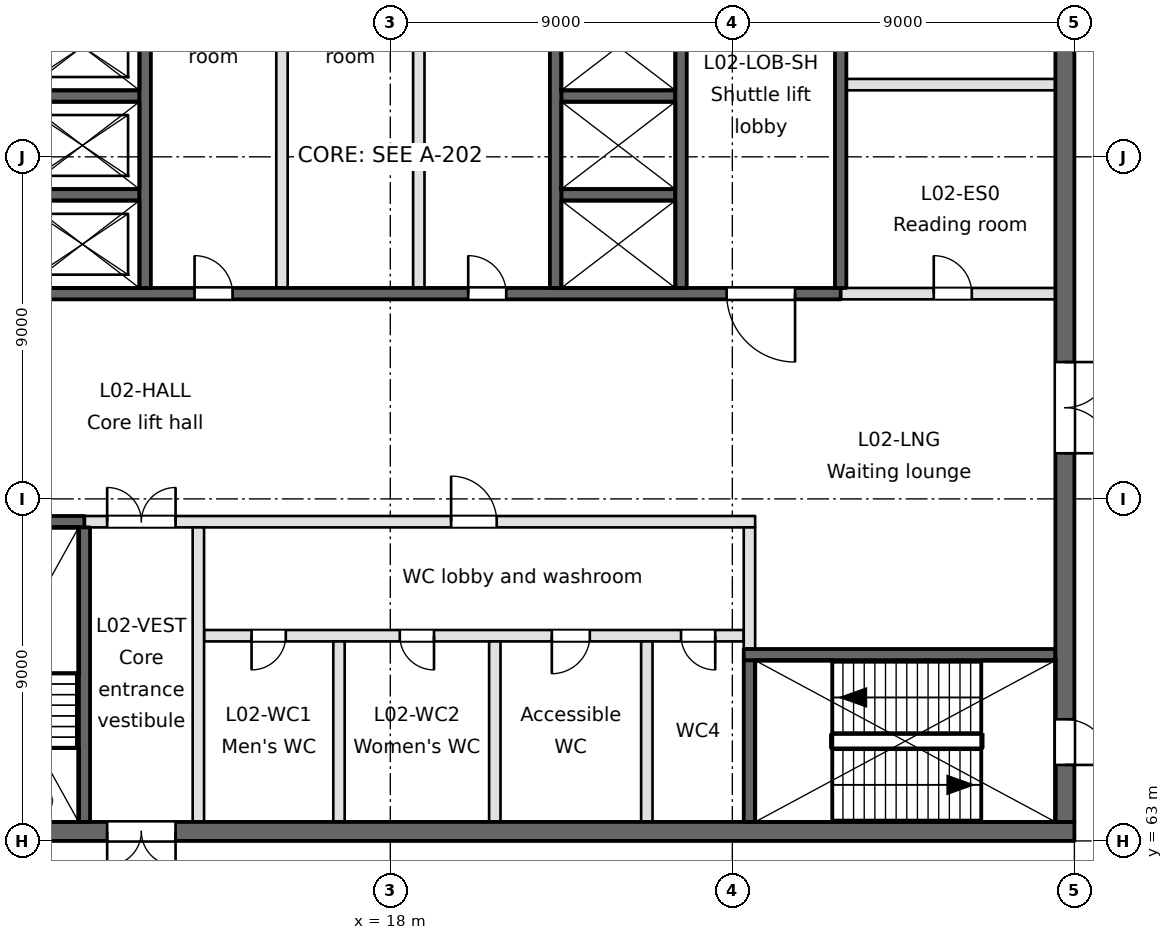
"""IFC4 building model, lengths in metres.
Left out: names, types, materials, properties, quantities, classifications, styles, units other than length and angle.
Written with IfcOpenShell. Run it as: python <this file> out.ifc"""

import sys

from ifc_helpers import new_model, si_unit, direction, frame, frame_2d, origin, place, context, subcontext, project, spatial, rectangle, extrude, element, fill, save


model = new_model("IFC4")
c1 = context("Model", 3, precision=1e-05, world=origin(), true_north=direction((0.0, 1.0)))
c2 = subcontext(c1, "Body", "Model", "MODEL_VIEW")
j1 = project(units=[si_unit("LENGTHUNIT", "METRE"), si_unit("PLANEANGLEUNIT", "RADIAN")], contexts=[c1])
p1 = place(None, origin())
s1 = spatial("IfcSite", under=j1, at=p1, CompositionType="ELEMENT")
p2 = place(p1, origin())
s2 = spatial("IfcBuilding", under=s1, at=p2, CompositionType="ELEMENT")
p3 = place(p2, frame((0.0, 0.0, 11.4)))
s3 = spatial("IfcBuildingStorey", under=s2, at=p3, CompositionType="ELEMENT", Elevation=11.4)
p4 = place(p3, frame((0.9, 63.25, -0.35), z_axis=(0.0, 0.0, 1.0), x_axis=(1.0, 0.0, 0.0)))
e1 = element("IfcWall", 1, at=p4, inside=s3, PredefinedType="SOLIDWALL", context=c2, shape_type="SweptSolid", body=[
    extrude(rectangle(XDim=35.1, YDim=0.5, at=frame_2d((17.55, 0.0))), origin(), (0.0, 0.0, 1.0), 5.4),
])
p5 = place(p4, frame((9.65, 0.0, 0.35)))
e2 = element("IfcOpeningElement", 2, at=p5, cuts=e1, PredefinedType="OPENING", context=c2, shape_type="SweptSolid", body=[
    extrude(rectangle(XDim=1.8, YDim=2.1, at=frame_2d((0.9, 1.05))), frame((0.0, 0.25, 0.0), z_axis=(0.0, -1.0, 0.0), x_axis=(1.0, 0.0, 0.0)), (0.0, 0.0, 1.0), 0.5),
])
p6 = place(p4, frame((1.55, 0.0, 0.35)))
e3 = element("IfcOpeningElement", 3, at=p6, cuts=e1, PredefinedType="OPENING", context=c2, shape_type="SweptSolid", body=[
    extrude(rectangle(XDim=1.2, YDim=2.1, at=frame_2d((0.6, 1.05))), frame((0.0, 0.25, 0.0), z_axis=(0.0, -1.0, 0.0), x_axis=(1.0, 0.0, 0.0)), (0.0, 0.0, 1.0), 0.5),
])
p7 = place(p4, frame((6.15, 0.0, 0.35)))
e4 = element("IfcOpeningElement", 4, at=p7, cuts=e1, PredefinedType="OPENING", context=c2, shape_type="SweptSolid", body=[
    extrude(rectangle(XDim=1.2, YDim=2.1, at=frame_2d((0.6, 1.05))), frame((0.0, 0.25, 0.0), z_axis=(0.0, -1.0, 0.0), x_axis=(1.0, 0.0, 0.0)), (0.0, 0.0, 1.0), 0.5),
])
p8 = place(p3, frame((27.3, 67.9, -0.35), z_axis=(0.0, 0.0, 1.0), x_axis=(1.0, 0.0, 0.0)))
e5 = element("IfcWall", 5, at=p8, inside=s3, PredefinedType="SOLIDWALL", context=c2, shape_type="SweptSolid", body=[
    extrude(rectangle(XDim=8.2, YDim=0.3, at=frame_2d((4.1, 0.0))), origin(), (0.0, 0.0, 1.0), 5.4),
])
p9 = place(p3, frame((13.1, 68.4, 0.0), z_axis=(0.0, 0.0, 1.0), x_axis=(1.0, 0.0, 0.0)))
e6 = element("IfcWall", 6, at=p9, inside=s3, PredefinedType="PARTITIONING", context=c2, shape_type="SweptSolid", body=[
    extrude(rectangle(XDim=14.2, YDim=0.3, at=frame_2d((7.1, 0.0))), origin(), (0.0, 0.0, 1.0), 5.05),
])
p10 = place(p9, frame((1.25, 0.0, 0.0)))
e7 = element("IfcOpeningElement", 7, at=p10, cuts=e6, PredefinedType="OPENING", context=c2, shape_type="SweptSolid", body=[
    extrude(rectangle(XDim=0.9, YDim=2.1, at=frame_2d((0.45, 1.05))), frame((0.0, 0.15, 0.0), z_axis=(0.0, -1.0, 0.0), x_axis=(1.0, 0.0, 0.0)), (0.0, 0.0, 1.0), 0.3),
])
p11 = place(p9, frame((5.15, 0.0, 0.0)))
e8 = element("IfcOpeningElement", 8, at=p11, cuts=e6, PredefinedType="OPENING", context=c2, shape_type="SweptSolid", body=[
    extrude(rectangle(XDim=0.9, YDim=2.1, at=frame_2d((0.45, 1.05))), frame((0.0, 0.15, 0.0), z_axis=(0.0, -1.0, 0.0), x_axis=(1.0, 0.0, 0.0)), (0.0, 0.0, 1.0), 0.3),
])
p12 = place(p9, frame((9.15, 0.0, 0.0)))
e9 = element("IfcOpeningElement", 9, at=p12, cuts=e6, PredefinedType="OPENING", context=c2, shape_type="SweptSolid", body=[
    extrude(rectangle(XDim=1.0, YDim=2.1, at=frame_2d((0.5, 1.05))), frame((0.0, 0.15, 0.0), z_axis=(0.0, -1.0, 0.0), x_axis=(1.0, 0.0, 0.0)), (0.0, 0.0, 1.0), 0.3),
])
p13 = place(p9, frame((12.55, 0.0, 0.0)))
e10 = element("IfcOpeningElement", 10, at=p13, cuts=e6, PredefinedType="OPENING", context=c2, shape_type="SweptSolid", body=[
    extrude(rectangle(XDim=0.9, YDim=2.1, at=frame_2d((0.45, 1.05))), frame((0.0, 0.15, 0.0), z_axis=(0.0, -1.0, 0.0), x_axis=(1.0, 0.0, 0.0)), (0.0, 0.0, 1.0), 0.3),
])
p14 = place(p3, frame((0.9, 71.4, -0.35), z_axis=(0.0, 0.0, 1.0), x_axis=(1.0, 0.0, 0.0)))
e11 = element("IfcWall", 11, at=p14, inside=s3, PredefinedType="SOLIDWALL", context=c2, shape_type="SweptSolid", body=[
    extrude(rectangle(XDim=9.05, YDim=0.3, at=frame_2d((4.525, 0.0))), origin(), (0.0, 0.0, 1.0), 5.4),
])
p15 = place(p3, frame((9.95, 71.4, 0.0), z_axis=(0.0, 0.0, 1.0), x_axis=(1.0, 0.0, 0.0)))
e12 = element("IfcWall", 12, at=p15, inside=s3, PredefinedType="PARTITIONING", context=c2, shape_type="SweptSolid", body=[
    extrude(rectangle(XDim=17.65, YDim=0.3, at=frame_2d((8.825, 0.0))), origin(), (0.0, 0.0, 1.0), 5.05),
])
p16 = place(p15, frame((0.6, 0.0, 0.0)))
e13 = element("IfcOpeningElement", 13, at=p16, cuts=e12, PredefinedType="OPENING", context=c2, shape_type="SweptSolid", body=[
    extrude(rectangle(XDim=1.8, YDim=2.1, at=frame_2d((0.9, 1.05))), frame((0.0, 0.15, 0.0), z_axis=(0.0, -1.0, 0.0), x_axis=(1.0, 0.0, 0.0)), (0.0, 0.0, 1.0), 0.3),
])
p17 = place(p15, frame((9.65, 0.0, 0.0)))
e14 = element("IfcOpeningElement", 14, at=p17, cuts=e12, PredefinedType="OPENING", context=c2, shape_type="SweptSolid", body=[
    extrude(rectangle(XDim=1.2, YDim=2.1, at=frame_2d((0.6, 1.05))), frame((0.0, 0.15, 0.0), z_axis=(0.0, -1.0, 0.0), x_axis=(1.0, 0.0, 0.0)), (0.0, 0.0, 1.0), 0.3),
])
p18 = place(p3, frame((0.9, 77.4, -0.35), z_axis=(0.0, 0.0, 1.0), x_axis=(1.0, 0.0, 0.0)))
e15 = element("IfcWall", 15, at=p18, inside=s3, PredefinedType="SOLIDWALL", context=c2, shape_type="SweptSolid", body=[
    extrude(rectangle(XDim=28.95, YDim=0.3, at=frame_2d((14.475, 0.0))), origin(), (0.0, 0.0, 1.0), 5.4),
])
p19 = place(p18, frame((4.35, 0.0, 0.35)))
e16 = element("IfcOpeningElement", 16, at=p19, cuts=e15, PredefinedType="OPENING", context=c2, shape_type="SweptSolid", body=[
    extrude(rectangle(XDim=1.8, YDim=2.1, at=frame_2d((0.9, 1.05))), frame((0.0, 0.15, 0.0), z_axis=(0.0, -1.0, 0.0), x_axis=(1.0, 0.0, 0.0)), (0.0, 0.0, 1.0), 0.3),
])
p20 = place(p18, frame((25.95, 0.0, 0.35)))
e17 = element("IfcOpeningElement", 17, at=p20, cuts=e15, PredefinedType="OPENING", context=c2, shape_type="SweptSolid", body=[
    extrude(rectangle(XDim=1.8, YDim=2.1, at=frame_2d((0.9, 1.05))), frame((0.0, 0.15, 0.0), z_axis=(0.0, -1.0, 0.0), x_axis=(1.0, 0.0, 0.0)), (0.0, 0.0, 1.0), 0.3),
])
p21 = place(p18, frame((11.95, 0.0, 0.35)))
e18 = element("IfcOpeningElement", 18, at=p21, cuts=e15, PredefinedType="OPENING", context=c2, shape_type="SweptSolid", body=[
    extrude(rectangle(XDim=1.0, YDim=2.1, at=frame_2d((0.5, 1.05))), frame((0.0, 0.15, 0.0), z_axis=(0.0, -1.0, 0.0), x_axis=(1.0, 0.0, 0.0)), (0.0, 0.0, 1.0), 0.3),
])
p22 = place(p18, frame((19.15, 0.0, 0.35)))
e19 = element("IfcOpeningElement", 19, at=p22, cuts=e15, PredefinedType="OPENING", context=c2, shape_type="SweptSolid", body=[
    extrude(rectangle(XDim=1.0, YDim=2.1, at=frame_2d((0.5, 1.05))), frame((0.0, 0.15, 0.0), z_axis=(0.0, -1.0, 0.0), x_axis=(1.0, 0.0, 0.0)), (0.0, 0.0, 1.0), 0.3),
])
p23 = place(p3, frame((29.85, 77.4, 0.0), z_axis=(0.0, 0.0, 1.0), x_axis=(1.0, 0.0, 0.0)))
e20 = element("IfcWall", 20, at=p23, inside=s3, PredefinedType="PARTITIONING", context=c2, shape_type="SweptSolid", body=[
    extrude(rectangle(XDim=5.65, YDim=0.3, at=frame_2d((2.825, 0.0))), origin(), (0.0, 0.0, 1.0), 5.05),
])
p24 = place(p23, frame((2.45, 0.0, 0.0)))
e21 = element("IfcOpeningElement", 21, at=p24, cuts=e20, PredefinedType="OPENING", context=c2, shape_type="SweptSolid", body=[
    extrude(rectangle(XDim=1.0, YDim=2.1, at=frame_2d((0.5, 1.05))), frame((0.0, 0.15, 0.0), z_axis=(0.0, -1.0, 0.0), x_axis=(1.0, 0.0, 0.0)), (0.0, 0.0, 1.0), 0.3),
])
for number, where, z_axis, x_axis in (
    (22, (8.4, 80.0, -0.35), (0.0, 0.0, 1.0), (1.0, 0.0, 0.0)),
    (23, (22.5, 80.0, -0.35), (0.0, 0.0, 1.0), (1.0, 0.0, 0.0)),
    (24, (8.4, 82.6, -0.35), (0.0, 0.0, 1.0), (1.0, 0.0, 0.0)),
    (25, (22.5, 82.6, -0.35), (0.0, 0.0, 1.0), (1.0, 0.0, 0.0)),
):
    element("IfcWall", number, at=place(p3, frame(where, z_axis=z_axis, x_axis=x_axis)), inside=s3, PredefinedType="SOLIDWALL", context=c2, shape_type="SweptSolid", body=[
        extrude(rectangle(XDim=3.0, YDim=0.3, at=frame_2d((1.5, 0.0))), origin(), (0.0, 0.0, 1.0), 5.4),
    ])
p25 = place(p3, frame((30.0, 82.9, 0.0), z_axis=(0.0, 0.0, 1.0), x_axis=(1.0, 0.0, 0.0)))
e26 = element("IfcWall", 26, at=p25, inside=s3, PredefinedType="PARTITIONING", context=c2, shape_type="SweptSolid", body=[
    extrude(rectangle(XDim=5.5, YDim=0.3, at=frame_2d((2.75, 0.0))), origin(), (0.0, 0.0, 1.0), 5.05),
])
p26 = place(p3, frame((9.95, 63.5, -0.35), z_axis=(0.0, 0.0, 1.0), x_axis=(0.0, 1.0, 0.0)))
e27 = element("IfcWall", 27, at=p26, inside=s3, PredefinedType="SOLIDWALL", context=c2, shape_type="SweptSolid", body=[
    extrude(rectangle(XDim=7.75, YDim=0.3, at=frame_2d((3.875, 0.0))), origin(), (0.0, 0.0, 1.0), 5.4),
])
p27 = place(p3, frame((11.55, 77.55, -0.35), z_axis=(0.0, 0.0, 1.0), x_axis=(0.0, 1.0, 0.0)))
e28 = element("IfcWall", 28, at=p27, inside=s3, PredefinedType="SOLIDWALL", context=c2, shape_type="SweptSolid", body=[
    extrude(rectangle(XDim=10.1, YDim=0.3, at=frame_2d((5.05, 0.0))), origin(), (0.0, 0.0, 1.0), 5.4),
])
p28 = place(p3, frame((12.95, 63.5, 0.0), z_axis=(0.0, 0.0, 1.0), x_axis=(0.0, 1.0, 0.0)))
e29 = element("IfcWall", 29, at=p28, inside=s3, PredefinedType="PARTITIONING", context=c2, shape_type="SweptSolid", body=[
    extrude(rectangle(XDim=7.75, YDim=0.3, at=frame_2d((3.875, 0.0))), origin(), (0.0, 0.0, 1.0), 5.05),
])
p29 = place(p3, frame((15.15, 77.55, 0.0), z_axis=(0.0, 0.0, 1.0), x_axis=(0.0, 1.0, 0.0)))
e30 = element("IfcWall", 30, at=p29, inside=s3, PredefinedType="PARTITIONING", context=c2, shape_type="SweptSolid", body=[
    extrude(rectangle(XDim=12.95, YDim=0.3, at=frame_2d((6.475, 0.0))), origin(), (0.0, 0.0, 1.0), 5.05),
])
p30 = place(p3, frame((16.65, 63.5, 0.0), z_axis=(0.0, 0.0, 1.0), x_axis=(0.0, 1.0, 0.0)))
e31 = element("IfcWall", 31, at=p30, inside=s3, PredefinedType="PARTITIONING", context=c2, shape_type="SweptSolid", body=[
    extrude(rectangle(XDim=4.75, YDim=0.3, at=frame_2d((2.375, 0.0))), origin(), (0.0, 0.0, 1.0), 5.05),
])
p31 = place(p3, frame((18.75, 77.55, 0.0), z_axis=(0.0, 0.0, 1.0), x_axis=(0.0, 1.0, 0.0)))
e32 = element("IfcWall", 32, at=p31, inside=s3, PredefinedType="PARTITIONING", context=c2, shape_type="SweptSolid", body=[
    extrude(rectangle(XDim=12.95, YDim=0.3, at=frame_2d((6.475, 0.0))), origin(), (0.0, 0.0, 1.0), 5.05),
])
p32 = place(p3, frame((20.75, 63.5, 0.0), z_axis=(0.0, 0.0, 1.0), x_axis=(0.0, 1.0, 0.0)))
e33 = element("IfcWall", 33, at=p32, inside=s3, PredefinedType="PARTITIONING", context=c2, shape_type="SweptSolid", body=[
    extrude(rectangle(XDim=4.75, YDim=0.3, at=frame_2d((2.375, 0.0))), origin(), (0.0, 0.0, 1.0), 5.05),
])
p33 = place(p3, frame((22.35, 77.55, -0.35), z_axis=(0.0, 0.0, 1.0), x_axis=(0.0, 1.0, 0.0)))
e34 = element("IfcWall", 34, at=p33, inside=s3, PredefinedType="SOLIDWALL", context=c2, shape_type="SweptSolid", body=[
    extrude(rectangle(XDim=10.1, YDim=0.3, at=frame_2d((5.05, 0.0))), origin(), (0.0, 0.0, 1.0), 5.4),
])
p34 = place(p3, frame((24.75, 63.5, 0.0), z_axis=(0.0, 0.0, 1.0), x_axis=(0.0, 1.0, 0.0)))
e35 = element("IfcWall", 35, at=p34, inside=s3, PredefinedType="PARTITIONING", context=c2, shape_type="SweptSolid", body=[
    extrude(rectangle(XDim=4.75, YDim=0.3, at=frame_2d((2.375, 0.0))), origin(), (0.0, 0.0, 1.0), 5.05),
])
p35 = place(p3, frame((25.65, 77.55, -0.35), z_axis=(0.0, 0.0, 1.0), x_axis=(0.0, 1.0, 0.0)))
e36 = element("IfcWall", 36, at=p35, inside=s3, PredefinedType="SOLIDWALL", context=c2, shape_type="SweptSolid", body=[
    extrude(rectangle(XDim=10.1, YDim=0.3, at=frame_2d((5.05, 0.0))), origin(), (0.0, 0.0, 1.0), 5.4),
])
p36 = place(p3, frame((27.45, 63.5, -0.35), z_axis=(0.0, 0.0, 1.0), x_axis=(0.0, 1.0, 0.0)))
e37 = element("IfcWall", 37, at=p36, inside=s3, PredefinedType="SOLIDWALL", context=c2, shape_type="SweptSolid", body=[
    extrude(rectangle(XDim=4.25, YDim=0.3, at=frame_2d((2.125, 0.0))), origin(), (0.0, 0.0, 1.0), 5.4),
])
p37 = place(p3, frame((27.45, 68.05, 0.0), z_axis=(0.0, 0.0, 1.0), x_axis=(0.0, 1.0, 0.0)))
e38 = element("IfcWall", 38, at=p37, inside=s3, PredefinedType="PARTITIONING", context=c2, shape_type="SweptSolid", body=[
    extrude(rectangle(XDim=3.2, YDim=0.3, at=frame_2d((1.6, 0.0))), origin(), (0.0, 0.0, 1.0), 5.05),
])
p38 = place(p3, frame((29.85, 77.55, -0.35), z_axis=(0.0, 0.0, 1.0), x_axis=(0.0, 1.0, 0.0)))
e39 = element("IfcWall", 39, at=p38, inside=s3, PredefinedType="SOLIDWALL", context=c2, shape_type="SweptSolid", body=[
    extrude(rectangle(XDim=10.1, YDim=0.3, at=frame_2d((5.05, 0.0))), origin(), (0.0, 0.0, 1.0), 5.4),
])
p39 = place(p3, frame((35.75, 63.5, -0.35), z_axis=(0.0, 0.0, 1.0), x_axis=(0.0, 1.0, 0.0)))
e40 = element("IfcWall", 40, at=p39, inside=s3, PredefinedType="SOLIDWALL", context=c2, shape_type="SweptSolid", body=[
    extrude(rectangle(XDim=34.6, YDim=0.5, at=frame_2d((17.3, 0.0))), origin(), (0.0, 0.0, 1.0), 5.4),
])
p40 = place(p39, frame((9.7, 0.0, 0.35)))
e41 = element("IfcOpeningElement", 41, at=p40, cuts=e40, PredefinedType="OPENING", context=c2, shape_type="SweptSolid", body=[
    extrude(rectangle(XDim=2.4, YDim=2.1, at=frame_2d((1.2, 1.05))), frame((0.0, 0.25, 0.0), z_axis=(0.0, -1.0, 0.0), x_axis=(1.0, 0.0, 0.0)), (0.0, 0.0, 1.0), 0.5),
])
p41 = place(p39, frame((27.9, 0.0, 0.35)))
e42 = element("IfcOpeningElement", 42, at=p41, cuts=e40, PredefinedType="OPENING", context=c2, shape_type="SweptSolid", body=[
    extrude(rectangle(XDim=1.5, YDim=2.1, at=frame_2d((0.75, 1.05))), frame((0.0, 0.25, 0.0), z_axis=(0.0, -1.0, 0.0), x_axis=(1.0, 0.0, 0.0)), (0.0, 0.0, 1.0), 0.5),
])
p42 = place(p39, frame((1.5, 0.0, 0.35)))
e43 = element("IfcOpeningElement", 43, at=p42, cuts=e40, PredefinedType="OPENING", context=c2, shape_type="SweptSolid", body=[
    extrude(rectangle(XDim=1.2, YDim=2.1, at=frame_2d((0.6, 1.05))), frame((0.0, 0.25, 0.0), z_axis=(0.0, -1.0, 0.0), x_axis=(1.0, 0.0, 0.0)), (0.0, 0.0, 1.0), 0.5),
])
p43 = place(p20, frame((1.8, 0.0, 0.0), z_axis=(0.0, 0.0, 1.0), x_axis=(-1.0, 0.0, 0.0)))
e44 = element("IfcDoor", 44, at=p43, inside=s3, OperationType="SINGLE_SWING_LEFT", PredefinedType="DOOR", context=c2, shape_type="SweptSolid", body=[
    extrude(rectangle(XDim=1.8, YDim=2.1, at=frame_2d((0.9, 1.05))), frame((0.0, 0.025, 0.0), z_axis=(0.0, -1.0, 0.0), x_axis=(1.0, 0.0, 0.0)), (0.0, 0.0, 1.0), 0.05),
])
fill(e17, e44)
p44 = place(p40, frame((2.4, 0.0, 0.0), z_axis=(0.0, 0.0, 1.0), x_axis=(-1.0, 0.0, 0.0)))
e45 = element("IfcDoor", 45, at=p44, inside=s3, OperationType="DOUBLE_DOOR_SINGLE_SWING", PredefinedType="DOOR", context=c2, shape_type="SweptSolid", body=[
    extrude(rectangle(XDim=2.4, YDim=2.1, at=frame_2d((1.2, 1.05))), frame((0.0, 0.025, 0.0), z_axis=(0.0, -1.0, 0.0), x_axis=(1.0, 0.0, 0.0)), (0.0, 0.0, 1.0), 0.05),
])
fill(e41, e45)
p45 = place(p5, frame((1.8, 0.0, 0.0), z_axis=(0.0, 0.0, 1.0), x_axis=(-1.0, 0.0, 0.0)))
e46 = element("IfcDoor", 46, at=p45, inside=s3, OperationType="DOUBLE_DOOR_SINGLE_SWING", PredefinedType="DOOR", context=c2, shape_type="SweptSolid", body=[
    extrude(rectangle(XDim=1.8, YDim=2.1, at=frame_2d((0.9, 1.05))), frame((0.0, 0.025, 0.0), z_axis=(0.0, -1.0, 0.0), x_axis=(1.0, 0.0, 0.0)), (0.0, 0.0, 1.0), 0.05),
])
fill(e2, e46)
p46 = place(p16, origin())
e47 = element("IfcDoor", 47, at=p46, inside=s3, OperationType="DOUBLE_DOOR_SINGLE_SWING", PredefinedType="DOOR", context=c2, shape_type="SweptSolid", body=[
    extrude(rectangle(XDim=1.8, YDim=2.1, at=frame_2d((0.9, 1.05))), frame((0.0, 0.025, 0.0), z_axis=(0.0, -1.0, 0.0), x_axis=(1.0, 0.0, 0.0)), (0.0, 0.0, 1.0), 0.05),
])
fill(e13, e47)
p47 = place(p10, frame((0.9, 0.0, 0.0), z_axis=(0.0, 0.0, 1.0), x_axis=(-1.0, 0.0, 0.0)))
e48 = element("IfcDoor", 48, at=p47, inside=s3, OperationType="SINGLE_SWING_RIGHT", PredefinedType="DOOR", context=c2, shape_type="SweptSolid", body=[
    extrude(rectangle(XDim=0.9, YDim=2.1, at=frame_2d((0.45, 1.05))), frame((0.0, 0.025, 0.0), z_axis=(0.0, -1.0, 0.0), x_axis=(1.0, 0.0, 0.0)), (0.0, 0.0, 1.0), 0.05),
])
fill(e7, e48)
p48 = place(p11, frame((0.9, 0.0, 0.0), z_axis=(0.0, 0.0, 1.0), x_axis=(-1.0, 0.0, 0.0)))
e49 = element("IfcDoor", 49, at=p48, inside=s3, OperationType="SINGLE_SWING_LEFT", PredefinedType="DOOR", context=c2, shape_type="SweptSolid", body=[
    extrude(rectangle(XDim=0.9, YDim=2.1, at=frame_2d((0.45, 1.05))), frame((0.0, 0.025, 0.0), z_axis=(0.0, -1.0, 0.0), x_axis=(1.0, 0.0, 0.0)), (0.0, 0.0, 1.0), 0.05),
])
fill(e8, e49)
p49 = place(p12, frame((1.0, 0.0, 0.0), z_axis=(0.0, 0.0, 1.0), x_axis=(-1.0, 0.0, 0.0)))
e50 = element("IfcDoor", 50, at=p49, inside=s3, OperationType="SINGLE_SWING_RIGHT", PredefinedType="DOOR", context=c2, shape_type="SweptSolid", body=[
    extrude(rectangle(XDim=1.0, YDim=2.1, at=frame_2d((0.5, 1.05))), frame((0.0, 0.025, 0.0), z_axis=(0.0, -1.0, 0.0), x_axis=(1.0, 0.0, 0.0)), (0.0, 0.0, 1.0), 0.05),
])
fill(e9, e50)
p50 = place(p13, frame((0.9, 0.0, 0.0), z_axis=(0.0, 0.0, 1.0), x_axis=(-1.0, 0.0, 0.0)))
e51 = element("IfcDoor", 51, at=p50, inside=s3, OperationType="SINGLE_SWING_LEFT", PredefinedType="DOOR", context=c2, shape_type="SweptSolid", body=[
    extrude(rectangle(XDim=0.9, YDim=2.1, at=frame_2d((0.45, 1.05))), frame((0.0, 0.025, 0.0), z_axis=(0.0, -1.0, 0.0), x_axis=(1.0, 0.0, 0.0)), (0.0, 0.0, 1.0), 0.05),
])
fill(e10, e51)
p51 = place(p17, origin())
e52 = element("IfcDoor", 52, at=p51, inside=s3, OperationType="SINGLE_SWING_LEFT", PredefinedType="DOOR", context=c2, shape_type="SweptSolid", body=[
    extrude(rectangle(XDim=1.2, YDim=2.1, at=frame_2d((0.6, 1.05))), frame((0.0, 0.025, 0.0), z_axis=(0.0, -1.0, 0.0), x_axis=(1.0, 0.0, 0.0)), (0.0, 0.0, 1.0), 0.05),
])
fill(e14, e52)
p52 = place(p42, frame((1.2, 0.0, 0.0), z_axis=(0.0, 0.0, 1.0), x_axis=(-1.0, 0.0, 0.0)))
e53 = element("IfcDoor", 53, at=p52, inside=s3, OperationType="SINGLE_SWING_RIGHT", PredefinedType="DOOR", context=c2, shape_type="SweptSolid", body=[
    extrude(rectangle(XDim=1.2, YDim=2.1, at=frame_2d((0.6, 1.05))), frame((0.0, 0.025, 0.0), z_axis=(0.0, -1.0, 0.0), x_axis=(1.0, 0.0, 0.0)), (0.0, 0.0, 1.0), 0.05),
])
fill(e43, e53)
p53 = place(p21, origin())
e54 = element("IfcDoor", 54, at=p53, inside=s3, OperationType="SINGLE_SWING_LEFT", PredefinedType="DOOR", context=c2, shape_type="SweptSolid", body=[
    extrude(rectangle(XDim=1.0, YDim=2.1, at=frame_2d((0.5, 1.05))), frame((0.0, 0.025, 0.0), z_axis=(0.0, -1.0, 0.0), x_axis=(1.0, 0.0, 0.0)), (0.0, 0.0, 1.0), 0.05),
])
fill(e18, e54)
p54 = place(p22, origin())
e55 = element("IfcDoor", 55, at=p54, inside=s3, OperationType="SINGLE_SWING_LEFT", PredefinedType="DOOR", context=c2, shape_type="SweptSolid", body=[
    extrude(rectangle(XDim=1.0, YDim=2.1, at=frame_2d((0.5, 1.05))), frame((0.0, 0.025, 0.0), z_axis=(0.0, -1.0, 0.0), x_axis=(1.0, 0.0, 0.0)), (0.0, 0.0, 1.0), 0.05),
])
fill(e19, e55)
p55 = place(p24, origin())
e56 = element("IfcDoor", 56, at=p55, inside=s3, OperationType="SINGLE_SWING_LEFT", PredefinedType="DOOR", context=c2, shape_type="SweptSolid", body=[
    extrude(rectangle(XDim=1.0, YDim=2.1, at=frame_2d((0.5, 1.05))), frame((0.0, 0.025, 0.0), z_axis=(0.0, -1.0, 0.0), x_axis=(1.0, 0.0, 0.0)), (0.0, 0.0, 1.0), 0.05),
])
fill(e21, e56)
save(model, sys.argv[1])
